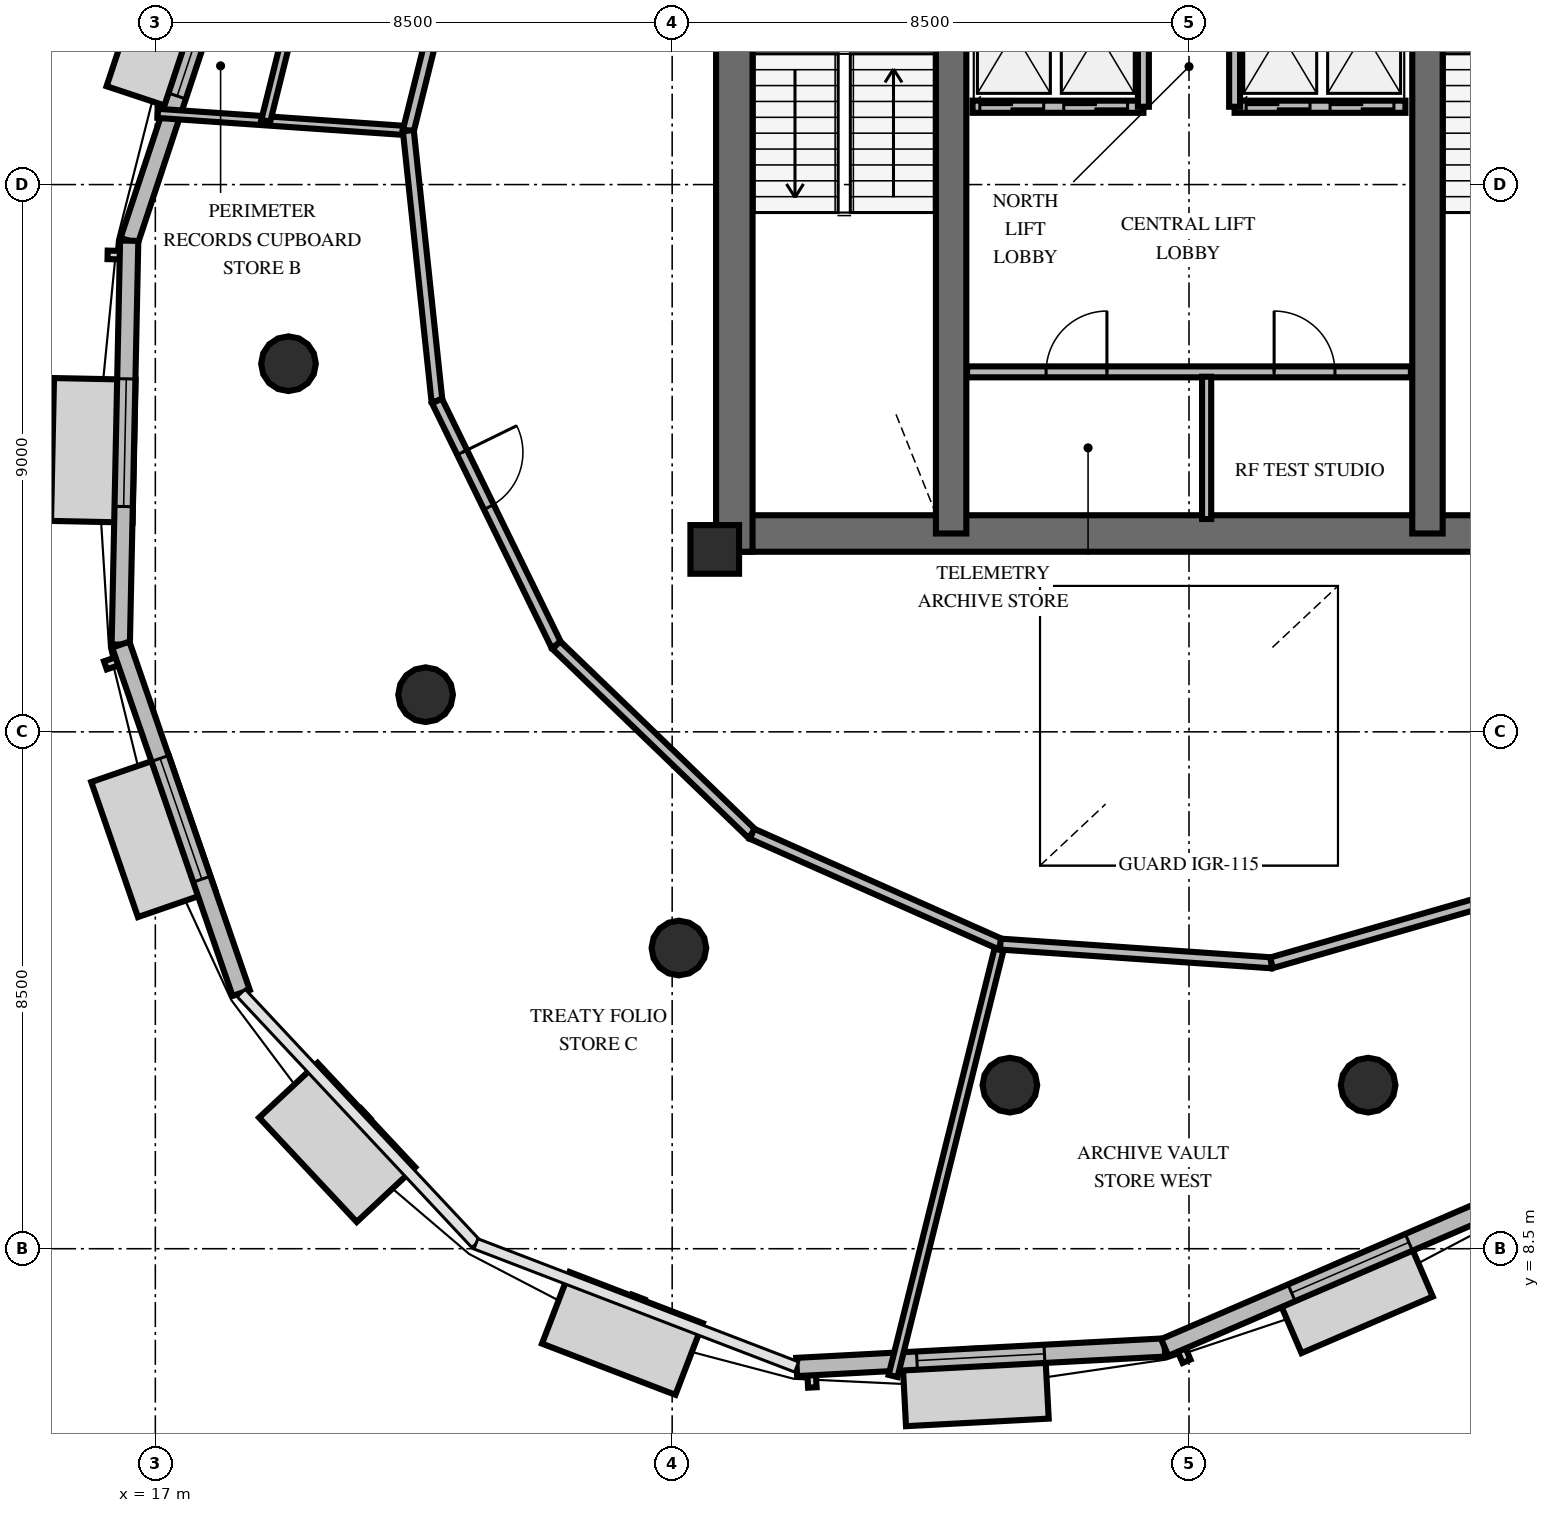
"""IFC4 building model, lengths in metres.
Left out: names, types, materials, properties, quantities, classifications, styles, units other than length and angle.
Written with IfcOpenShell. Run it as: python <this file> out.ifc"""

import sys

from ifc_helpers import new_model, si_unit, direction, frame, frame_2d, origin, origin_2d, place, context, subcontext, project, spatial, rectangle, circle, extrude, element, fill, save


model = new_model("IFC4")
c1 = context("Model", 3, precision=1e-05, world=origin(), true_north=direction((0.0, 1.0)))
c2 = subcontext(c1, "Body", "Model", "MODEL_VIEW")
j1 = project(units=[si_unit("LENGTHUNIT", "METRE"), si_unit("PLANEANGLEUNIT", "RADIAN")], contexts=[c1])
p1 = place(None, origin())
s1 = spatial("IfcSite", under=j1, at=p1, CompositionType="ELEMENT")
p2 = place(p1, origin())
s2 = spatial("IfcBuilding", under=s1, at=p2, CompositionType="ELEMENT")
p3 = place(p2, frame((0.0, 0.0, 262.8)))
s3 = spatial("IfcBuildingStorey", under=s2, at=p3, CompositionType="ELEMENT", Elevation=262.8)
p4 = place(p3, frame((26.222, 20.262, 0.0), z_axis=(0.0, 0.0, 1.0), x_axis=(1.0, 0.0, 0.0)))
e1 = element("IfcWall", 1, at=p4, inside=s3, PredefinedType="SHEAR", context=c2, shape_type="SweptSolid", body=[
    extrude(rectangle(XDim=15.566, YDim=0.6, at=frame_2d((7.783, 0.0))), origin(), (0.0, 0.0, 1.0), 3.6),
])
p5 = place(p3, frame((26.522, 19.962, 0.0), z_axis=(0.0, 0.0, 1.0), x_axis=(0.0, 1.0, 0.0)))
e2 = element("IfcWall", 2, at=p5, inside=s3, PredefinedType="SHEAR", context=c2, shape_type="SweptSolid", body=[
    extrude(rectangle(XDim=10.276, YDim=0.6, at=frame_2d((5.138, 0.0))), origin(), (0.0, 0.0, 1.0), 3.6),
])
for number, where, z_axis, x_axis in (
    (3, (30.088, 20.262, 0.0), (0.0, 0.0, 1.0), (0.0, 1.0, 0.0)),
    (4, (37.922, 20.262, 0.0), (0.0, 0.0, 1.0), (0.0, 1.0, 0.0)),
):
    element("IfcWall", number, at=place(p3, frame(where, z_axis=z_axis, x_axis=x_axis)), inside=s3, PredefinedType="SHEAR", context=c2, shape_type="SweptSolid", body=[
        extrude(rectangle(XDim=9.676, YDim=0.5, at=frame_2d((4.838, 0.0))), origin(), (0.0, 0.0, 1.0), 3.6),
    ])
p6 = place(p3, frame((26.2, 20.0, 0.0), z_axis=(0.0, 0.0, 1.0), x_axis=(1.0, 0.0, 0.0)))
e5 = element("IfcColumn", 5, at=p6, inside=s3, PredefinedType="PILASTER", context=c2, shape_type="SweptSolid", body=[
    extrude(rectangle(XDim=0.8, YDim=0.8, at=origin_2d()), origin(), (0.0, 0.0, 1.0), 3.6),
])
for number, where, z_axis, x_axis in (
    (6, (19.19, 23.054, 0.0), (0.0, 0.0, 1.0), (1.0, 0.0, 0.0)),
    (7, (21.445, 17.611, 0.0), (0.0, 0.0, 1.0), (1.0, 0.0, 0.0)),
    (8, (25.611, 13.445, 0.0), (0.0, 0.0, 1.0), (1.0, 0.0, 0.0)),
    (9, (31.054, 11.19, 0.0), (0.0, 0.0, 1.0), (1.0, 0.0, 0.0)),
    (10, (36.946, 11.19, 0.0), (0.0, 0.0, 1.0), (1.0, 0.0, 0.0)),
):
    element("IfcColumn", number, at=place(p3, frame(where, z_axis=z_axis, x_axis=x_axis)), inside=s3, PredefinedType="COLUMN", context=c2, shape_type="SweptSolid", body=[
        extrude(circle(Radius=0.45, at=origin_2d()), origin(), (0.0, 0.0, 1.0), 3.6),
    ])
p7 = place(p3, frame((18.811, 31.83, 0.0), z_axis=(0.0, 0.0, 1.0), x_axis=(-0.314951068445, -0.949107909821, 0.0)))
e11 = element("IfcWall", 11, at=p7, inside=s3, PredefinedType="SOLIDWALL", context=c2, shape_type="SweptSolid", body=[
    extrude(rectangle(XDim=7.115, YDim=0.3, at=frame_2d((3.558, 0.0))), origin(), (0.0, 0.0, 1.0), 2.76),
])
p8 = place(p7, frame((2.508, 0.0, 0.8)))
e12 = element("IfcOpeningElement", 12, at=p8, cuts=e11, PredefinedType="OPENING", context=c2, shape_type="SweptSolid", body=[
    extrude(rectangle(XDim=2.1, YDim=1.85, at=frame_2d((1.05, 0.925))), frame((0.0, 0.16, 0.0), z_axis=(0.0, -1.0, 0.0), x_axis=(1.0, 0.0, 0.0)), (0.0, 0.0, 1.0), 0.32),
])
p9 = place(p3, frame((16.57, 25.077, 0.0), z_axis=(0.0, 0.0, 1.0), x_axis=(-0.020874732842, -0.999782099024, 0.0)))
e13 = element("IfcWall", 13, at=p9, inside=s3, PredefinedType="SOLIDWALL", context=c2, shape_type="SweptSolid", body=[
    extrude(rectangle(XDim=6.643, YDim=0.3, at=frame_2d((3.322, 0.0))), origin(), (0.0, 0.0, 1.0), 2.76),
])
p10 = place(p9, frame((2.272, 0.0, 0.8)))
e14 = element("IfcOpeningElement", 14, at=p10, cuts=e13, PredefinedType="OPENING", context=c2, shape_type="SweptSolid", body=[
    extrude(rectangle(XDim=2.1, YDim=1.85, at=frame_2d((1.05, 0.925))), frame((0.0, 0.16, 0.0), z_axis=(0.0, -1.0, 0.0), x_axis=(1.0, 0.0, 0.0)), (0.0, 0.0, 1.0), 0.32),
])
p11 = place(p3, frame((16.431, 18.435, 0.0), z_axis=(0.0, 0.0, 1.0), x_axis=(0.326672023945, -0.945137761795, 0.0)))
e15 = element("IfcWall", 15, at=p11, inside=s3, PredefinedType="SOLIDWALL", context=c2, shape_type="SweptSolid", body=[
    extrude(rectangle(XDim=6.062, YDim=0.3, at=frame_2d((3.031, 0.0))), origin(), (0.0, 0.0, 1.0), 2.76),
])
p12 = place(p11, frame((1.981, 0.0, 0.8)))
e16 = element("IfcOpeningElement", 16, at=p12, cuts=e15, PredefinedType="OPENING", context=c2, shape_type="SweptSolid", body=[
    extrude(rectangle(XDim=2.1, YDim=1.85, at=frame_2d((1.05, 0.925))), frame((0.0, 0.16, 0.0), z_axis=(0.0, -1.0, 0.0), x_axis=(1.0, 0.0, 0.0)), (0.0, 0.0, 1.0), 0.32),
])
p13 = place(p3, frame((27.547, 6.555, 0.0), z_axis=(0.0, 0.0, 1.0), x_axis=(0.998600866894, 0.052880134633, 0.0)))
e17 = element("IfcWall", 17, at=p13, inside=s3, PredefinedType="SOLIDWALL", context=c2, shape_type="SweptSolid", body=[
    extrude(rectangle(XDim=6.062, YDim=0.3, at=frame_2d((3.031, 0.0))), origin(), (0.0, 0.0, 1.0), 2.76),
])
p14 = place(p13, frame((1.981, 0.0, 0.8)))
e18 = element("IfcOpeningElement", 18, at=p14, cuts=e17, PredefinedType="OPENING", context=c2, shape_type="SweptSolid", body=[
    extrude(rectangle(XDim=2.1, YDim=1.85, at=frame_2d((1.05, 0.925))), frame((0.0, 0.16, 0.0), z_axis=(0.0, -1.0, 0.0), x_axis=(1.0, 0.0, 0.0)), (0.0, 0.0, 1.0), 0.32),
])
p15 = place(p3, frame((33.601, 6.876, 0.0), z_axis=(0.0, 0.0, 1.0), x_axis=(0.918476494061, 0.395475574287, 0.0)))
e19 = element("IfcWall", 19, at=p15, inside=s3, PredefinedType="SOLIDWALL", context=c2, shape_type="SweptSolid", body=[
    extrude(rectangle(XDim=6.643, YDim=0.3, at=frame_2d((3.322, 0.0))), origin(), (0.0, 0.0, 1.0), 2.76),
])
p16 = place(p15, frame((2.272, 0.0, 0.8)))
e20 = element("IfcOpeningElement", 20, at=p16, cuts=e19, PredefinedType="OPENING", context=c2, shape_type="SweptSolid", body=[
    extrude(rectangle(XDim=2.1, YDim=1.85, at=frame_2d((1.05, 0.925))), frame((0.0, 0.16, 0.0), z_axis=(0.0, -1.0, 0.0), x_axis=(1.0, 0.0, 0.0)), (0.0, 0.0, 1.0), 0.32),
])
p17 = place(p3, frame((30.35, 22.92, 0.0), z_axis=(0.0, 0.0, 1.0), x_axis=(1.0, 0.0, 0.0)))
e21 = element("IfcWall", 21, at=p17, inside=s3, PredefinedType="PARTITIONING", context=c2, shape_type="SweptSolid", body=[
    extrude(rectangle(XDim=7.3, YDim=0.18, at=frame_2d((3.65, 0.0))), origin(), (0.0, 0.0, 1.0), 2.46),
])
p18 = place(p17, frame((1.3, 0.0, 0.0)))
e22 = element("IfcOpeningElement", 22, at=p18, cuts=e21, PredefinedType="OPENING", context=c2, shape_type="SweptSolid", body=[
    extrude(rectangle(XDim=1.0, YDim=2.15, at=frame_2d((0.5, 1.075))), frame((0.0, 0.1, 0.0), z_axis=(0.0, -1.0, 0.0), x_axis=(1.0, 0.0, 0.0)), (0.0, 0.0, 1.0), 0.2),
])
p19 = place(p17, frame((5.05, 0.0, 0.0)))
e23 = element("IfcOpeningElement", 23, at=p19, cuts=e21, PredefinedType="OPENING", context=c2, shape_type="SweptSolid", body=[
    extrude(rectangle(XDim=1.0, YDim=2.15, at=frame_2d((0.5, 1.075))), frame((0.0, 0.1, 0.0), z_axis=(0.0, -1.0, 0.0), x_axis=(1.0, 0.0, 0.0)), (0.0, 0.0, 1.0), 0.2),
])
p20 = place(p3, frame((34.29, 20.5, 0.0), z_axis=(0.0, 0.0, 1.0), x_axis=(0.0, 1.0, 0.0)))
e24 = element("IfcWall", 24, at=p20, inside=s3, PredefinedType="PARTITIONING", context=c2, shape_type="SweptSolid", body=[
    extrude(rectangle(XDim=2.34, YDim=0.15, at=frame_2d((1.17, 0.0))), origin(), (0.0, 0.0, 1.0), 2.46),
])
p21 = place(p3, frame((30.44, 27.28, 0.0), z_axis=(0.0, 0.0, 1.0), x_axis=(1.0, 0.0, 0.0)))
e25 = element("IfcWall", 25, at=p21, inside=s3, PredefinedType="SOLIDWALL", context=c2, shape_type="SweptSolid", body=[
    extrude(rectangle(XDim=2.81, YDim=0.2, at=frame_2d((1.405, 0.0))), origin(), (0.0, 0.0, 1.0), 2.46),
])
p22 = place(p21, frame((0.12, 0.0, 0.0)))
e26 = element("IfcOpeningElement", 26, at=p22, cuts=e25, PredefinedType="OPENING", context=c2, shape_type="SweptSolid", body=[
    extrude(rectangle(XDim=1.05, YDim=2.1, at=frame_2d((0.525, 1.05))), frame((0.0, 0.11, 0.0), z_axis=(0.0, -1.0, 0.0), x_axis=(1.0, 0.0, 0.0)), (0.0, 0.0, 1.0), 0.22),
])
p23 = place(p21, frame((1.5, 0.0, 0.0)))
e27 = element("IfcOpeningElement", 27, at=p23, cuts=e25, PredefinedType="OPENING", context=c2, shape_type="SweptSolid", body=[
    extrude(rectangle(XDim=1.05, YDim=2.1, at=frame_2d((0.525, 1.05))), frame((0.0, 0.11, 0.0), z_axis=(0.0, -1.0, 0.0), x_axis=(1.0, 0.0, 0.0)), (0.0, 0.0, 1.0), 0.22),
])
p24 = place(p3, frame((33.25, 27.28, 0.0), z_axis=(0.0, 0.0, 1.0), x_axis=(0.0, 1.0, 0.0)))
e28 = element("IfcWall", 28, at=p24, inside=s3, PredefinedType="SOLIDWALL", context=c2, shape_type="SweptSolid", body=[
    extrude(rectangle(XDim=2.47, YDim=0.18, at=frame_2d((1.235, 0.0))), origin(), (0.0, 0.0, 1.0), 2.46),
])
p25 = place(p3, frame((34.75, 27.28, 0.0), z_axis=(0.0, 0.0, 1.0), x_axis=(1.0, 0.0, 0.0)))
e29 = element("IfcWall", 29, at=p25, inside=s3, PredefinedType="SOLIDWALL", context=c2, shape_type="SweptSolid", body=[
    extrude(rectangle(XDim=2.81, YDim=0.2, at=frame_2d((1.405, 0.0))), origin(), (0.0, 0.0, 1.0), 2.46),
])
p26 = place(p25, frame((0.19, 0.0, 0.0)))
e30 = element("IfcOpeningElement", 30, at=p26, cuts=e29, PredefinedType="OPENING", context=c2, shape_type="SweptSolid", body=[
    extrude(rectangle(XDim=1.05, YDim=2.1, at=frame_2d((0.525, 1.05))), frame((0.0, 0.11, 0.0), z_axis=(0.0, -1.0, 0.0), x_axis=(1.0, 0.0, 0.0)), (0.0, 0.0, 1.0), 0.22),
])
p27 = place(p25, frame((1.57, 0.0, 0.0)))
e31 = element("IfcOpeningElement", 31, at=p27, cuts=e29, PredefinedType="OPENING", context=c2, shape_type="SweptSolid", body=[
    extrude(rectangle(XDim=1.05, YDim=2.1, at=frame_2d((0.525, 1.05))), frame((0.0, 0.11, 0.0), z_axis=(0.0, -1.0, 0.0), x_axis=(1.0, 0.0, 0.0)), (0.0, 0.0, 1.0), 0.22),
])
p28 = place(p3, frame((34.75, 27.28, 0.0), z_axis=(0.0, 0.0, 1.0), x_axis=(0.0, 1.0, 0.0)))
e32 = element("IfcWall", 32, at=p28, inside=s3, PredefinedType="SOLIDWALL", context=c2, shape_type="SweptSolid", body=[
    extrude(rectangle(XDim=2.47, YDim=0.18, at=frame_2d((1.235, 0.0))), origin(), (0.0, 0.0, 1.0), 2.46),
])
p29 = place(p3, frame((21.161, 26.887, 0.0), z_axis=(0.0, 0.0, 1.0), x_axis=(-0.997629768719, 0.068810206849, 0.0)))
e33 = element("IfcWall", 33, at=p29, inside=s3, PredefinedType="PARTITIONING", context=c2, shape_type="SweptSolid", body=[
    extrude(rectangle(XDim=4.13, YDim=0.15, at=frame_2d((2.065, 0.0))), origin(), (0.0, 0.0, 1.0), 2.46),
])
p30 = place(p3, frame((22.238, 31.224, 0.0), z_axis=(0.0, 0.0, 1.0), x_axis=(-0.241057272798, -0.970510891866, 0.0)))
e34 = element("IfcWall", 34, at=p30, inside=s3, PredefinedType="PARTITIONING", context=c2, shape_type="SweptSolid", body=[
    extrude(rectangle(XDim=4.469, YDim=0.18, at=frame_2d((2.235, 0.0))), origin(), (0.0, 0.0, 1.0), 2.46),
])
p31 = place(p30, frame((0.942, 0.0, 0.0)))
e35 = element("IfcOpeningElement", 35, at=p31, cuts=e34, PredefinedType="OPENING", context=c2, shape_type="SweptSolid", body=[
    extrude(rectangle(XDim=1.0, YDim=2.15, at=frame_2d((0.5, 1.075))), frame((0.0, 0.1, 0.0), z_axis=(0.0, -1.0, 0.0), x_axis=(1.0, 0.0, 0.0)), (0.0, 0.0, 1.0), 0.2),
])
p32 = place(p3, frame((20.09, 32.178, 0.0), z_axis=(0.0, 0.0, 1.0), x_axis=(-0.241046509173, -0.970513565292, 0.0)))
e36 = element("IfcWall", 36, at=p32, inside=s3, PredefinedType="PARTITIONING", context=c2, shape_type="SweptSolid", body=[
    extrude(rectangle(XDim=5.286, YDim=0.15, at=frame_2d((2.643, 0.0))), origin(), (0.0, 0.0, 1.0), 2.46),
])
p33 = place(p32, frame((1.174, 0.0, 0.0)))
e37 = element("IfcOpeningElement", 37, at=p33, cuts=e36, PredefinedType="OPENING", context=c2, shape_type="SweptSolid", body=[
    extrude(rectangle(XDim=0.95, YDim=2.15, at=frame_2d((0.475, 1.075))), frame((0.0, 0.085, 0.0), z_axis=(0.0, -1.0, 0.0), x_axis=(1.0, 0.0, 0.0)), (0.0, 0.0, 1.0), 0.17),
])
p34 = place(p3, frame((30.897, 13.51, 0.0), z_axis=(0.0, 0.0, 1.0), x_axis=(-0.241098880109, -0.970500556419, 0.0)))
e38 = element("IfcWall", 38, at=p34, inside=s3, PredefinedType="PARTITIONING", context=c2, shape_type="SweptSolid", body=[
    extrude(rectangle(XDim=7.318, YDim=0.15, at=frame_2d((3.659, 0.0))), origin(), (0.0, 0.0, 1.0), 2.46),
])
p35 = place(p3, frame((21.161, 26.887, 0.0), z_axis=(0.0, 0.0, 1.0), x_axis=(0.10536430775, -0.994433689419, 0.0)))
e39 = element("IfcWall", 39, at=p35, inside=s3, PredefinedType="PARTITIONING", context=c2, shape_type="SweptSolid", body=[
    extrude(rectangle(XDim=4.47, YDim=0.18, at=frame_2d((2.235, 0.0))), origin(), (0.0, 0.0, 1.0), 2.46),
])
p36 = place(p3, frame((21.632, 22.442, 0.0), z_axis=(0.0, 0.0, 1.0), x_axis=(0.439133720945, -0.898421713411, 0.0)))
e40 = element("IfcWall", 40, at=p36, inside=s3, PredefinedType="PARTITIONING", context=c2, shape_type="SweptSolid", body=[
    extrude(rectangle(XDim=4.47, YDim=0.18, at=frame_2d((2.235, 0.0))), origin(), (0.0, 0.0, 1.0), 2.46),
])
p37 = place(p36, frame((0.942, 0.0, 0.0)))
e41 = element("IfcOpeningElement", 41, at=p37, cuts=e40, PredefinedType="OPENING", context=c2, shape_type="SweptSolid", body=[
    extrude(rectangle(XDim=1.0, YDim=2.15, at=frame_2d((0.5, 1.075))), frame((0.0, 0.1, 0.0), z_axis=(0.0, -1.0, 0.0), x_axis=(1.0, 0.0, 0.0)), (0.0, 0.0, 1.0), 0.2),
])
for number, where, z_axis, x_axis in (
    (42, (23.594, 18.426, 0.0), (0.0, 0.0, 1.0), (0.72, -0.694, 0.0)),
    (43, (26.812, 15.324, 0.0), (0.0, 0.0, 1.0), (0.914, -0.406, 0.0)),
):
    element("IfcWall", number, at=place(p3, frame(where, z_axis=z_axis, x_axis=x_axis)), inside=s3, PredefinedType="PARTITIONING", context=c2, shape_type="SweptSolid", body=[
        extrude(rectangle(XDim=4.47, YDim=0.18, at=frame_2d((2.235, 0.0))), origin(), (0.0, 0.0, 1.0), 2.46),
    ])
p38 = place(p3, frame((30.897, 13.51, 0.0), z_axis=(0.0, 0.0, 1.0), x_axis=(0.997625024819, -0.068878950739, 0.0)))
e44 = element("IfcWall", 44, at=p38, inside=s3, PredefinedType="PARTITIONING", context=c2, shape_type="SweptSolid", body=[
    extrude(rectangle(XDim=4.469, YDim=0.18, at=frame_2d((2.235, 0.0))), origin(), (0.0, 0.0, 1.0), 2.46),
])
p39 = place(p3, frame((35.356, 13.202, 0.0), z_axis=(0.0, 0.0, 1.0), x_axis=(0.961015255025, 0.276495351878, 0.0)))
e45 = element("IfcWall", 45, at=p39, inside=s3, PredefinedType="PARTITIONING", context=c2, shape_type="SweptSolid", body=[
    extrude(rectangle(XDim=4.47, YDim=0.18, at=frame_2d((2.235, 0.0))), origin(), (0.0, 0.0, 1.0), 2.46),
])
p40 = place(p8, origin())
e46 = element("IfcWindow", 46, at=p40, inside=s3, PartitioningType="SINGLE_PANEL", PredefinedType="WINDOW", context=c2, shape_type="SweptSolid", body=[
    extrude(rectangle(XDim=2.1, YDim=1.85, at=frame_2d((1.05, 0.925))), frame((0.0, 0.03, 0.0), z_axis=(0.0, -1.0, 0.0), x_axis=(1.0, 0.0, 0.0)), (0.0, 0.0, 1.0), 0.06),
])
fill(e12, e46)
p41 = place(p10, origin())
e47 = element("IfcWindow", 47, at=p41, inside=s3, PartitioningType="SINGLE_PANEL", PredefinedType="WINDOW", context=c2, shape_type="SweptSolid", body=[
    extrude(rectangle(XDim=2.1, YDim=1.85, at=frame_2d((1.05, 0.925))), frame((0.0, 0.03, 0.0), z_axis=(0.0, -1.0, 0.0), x_axis=(1.0, 0.0, 0.0)), (0.0, 0.0, 1.0), 0.06),
])
fill(e14, e47)
p42 = place(p12, origin())
e48 = element("IfcWindow", 48, at=p42, inside=s3, PartitioningType="SINGLE_PANEL", PredefinedType="WINDOW", context=c2, shape_type="SweptSolid", body=[
    extrude(rectangle(XDim=2.1, YDim=1.85, at=frame_2d((1.05, 0.925))), frame((0.0, 0.03, 0.0), z_axis=(0.0, -1.0, 0.0), x_axis=(1.0, 0.0, 0.0)), (0.0, 0.0, 1.0), 0.06),
])
fill(e16, e48)
p43 = place(p14, origin())
e49 = element("IfcWindow", 49, at=p43, inside=s3, PartitioningType="SINGLE_PANEL", PredefinedType="WINDOW", context=c2, shape_type="SweptSolid", body=[
    extrude(rectangle(XDim=2.1, YDim=1.85, at=frame_2d((1.05, 0.925))), frame((0.0, 0.03, 0.0), z_axis=(0.0, -1.0, 0.0), x_axis=(1.0, 0.0, 0.0)), (0.0, 0.0, 1.0), 0.06),
])
fill(e18, e49)
p44 = place(p16, origin())
e50 = element("IfcWindow", 50, at=p44, inside=s3, PartitioningType="SINGLE_PANEL", PredefinedType="WINDOW", context=c2, shape_type="SweptSolid", body=[
    extrude(rectangle(XDim=2.1, YDim=1.85, at=frame_2d((1.05, 0.925))), frame((0.0, 0.03, 0.0), z_axis=(0.0, -1.0, 0.0), x_axis=(1.0, 0.0, 0.0)), (0.0, 0.0, 1.0), 0.06),
])
fill(e20, e50)
p45 = place(p18, origin())
e51 = element("IfcDoor", 51, at=p45, inside=s3, OperationType="SINGLE_SWING_RIGHT", PredefinedType="DOOR", context=c2, shape_type="SweptSolid", body=[
    extrude(rectangle(XDim=1.0, YDim=2.15, at=frame_2d((0.5, 1.075))), frame((0.0, 0.025, 0.0), z_axis=(0.0, -1.0, 0.0), x_axis=(1.0, 0.0, 0.0)), (0.0, 0.0, 1.0), 0.05),
])
fill(e22, e51)
p46 = place(p19, origin())
e52 = element("IfcDoor", 52, at=p46, inside=s3, OperationType="SINGLE_SWING_LEFT", PredefinedType="DOOR", context=c2, shape_type="SweptSolid", body=[
    extrude(rectangle(XDim=1.0, YDim=2.15, at=frame_2d((0.5, 1.075))), frame((0.0, 0.025, 0.0), z_axis=(0.0, -1.0, 0.0), x_axis=(1.0, 0.0, 0.0)), (0.0, 0.0, 1.0), 0.05),
])
fill(e23, e52)
p47 = place(p22, origin())
e53 = element("IfcDoor", 53, at=p47, inside=s3, OperationType="DOUBLE_DOOR_SLIDING", PredefinedType="USERDEFINED", context=c2, shape_type="SweptSolid", body=[
    extrude(rectangle(XDim=1.05, YDim=2.1, at=frame_2d((0.525, 1.05))), frame((0.0, 0.025, 0.0), z_axis=(0.0, -1.0, 0.0), x_axis=(1.0, 0.0, 0.0)), (0.0, 0.0, 1.0), 0.05),
])
fill(e26, e53)
p48 = place(p23, origin())
e54 = element("IfcDoor", 54, at=p48, inside=s3, OperationType="DOUBLE_DOOR_SLIDING", PredefinedType="USERDEFINED", context=c2, shape_type="SweptSolid", body=[
    extrude(rectangle(XDim=1.05, YDim=2.1, at=frame_2d((0.525, 1.05))), frame((0.0, 0.025, 0.0), z_axis=(0.0, -1.0, 0.0), x_axis=(1.0, 0.0, 0.0)), (0.0, 0.0, 1.0), 0.05),
])
fill(e27, e54)
p49 = place(p26, origin())
e55 = element("IfcDoor", 55, at=p49, inside=s3, OperationType="DOUBLE_DOOR_SLIDING", PredefinedType="USERDEFINED", context=c2, shape_type="SweptSolid", body=[
    extrude(rectangle(XDim=1.05, YDim=2.1, at=frame_2d((0.525, 1.05))), frame((0.0, 0.025, 0.0), z_axis=(0.0, -1.0, 0.0), x_axis=(1.0, 0.0, 0.0)), (0.0, 0.0, 1.0), 0.05),
])
fill(e30, e55)
p50 = place(p27, origin())
e56 = element("IfcDoor", 56, at=p50, inside=s3, OperationType="DOUBLE_DOOR_SLIDING", PredefinedType="USERDEFINED", context=c2, shape_type="SweptSolid", body=[
    extrude(rectangle(XDim=1.05, YDim=2.1, at=frame_2d((0.525, 1.05))), frame((0.0, 0.025, 0.0), z_axis=(0.0, -1.0, 0.0), x_axis=(1.0, 0.0, 0.0)), (0.0, 0.0, 1.0), 0.05),
])
fill(e31, e56)
p51 = place(p37, origin())
e57 = element("IfcDoor", 57, at=p51, inside=s3, OperationType="SINGLE_SWING_LEFT", PredefinedType="DOOR", context=c2, shape_type="SweptSolid", body=[
    extrude(rectangle(XDim=1.0, YDim=2.15, at=frame_2d((0.5, 1.075))), frame((0.0, 0.025, 0.0), z_axis=(0.0, -1.0, 0.0), x_axis=(1.0, 0.0, 0.0)), (0.0, 0.0, 1.0), 0.05),
])
fill(e41, e57)
save(model, sys.argv[1])
